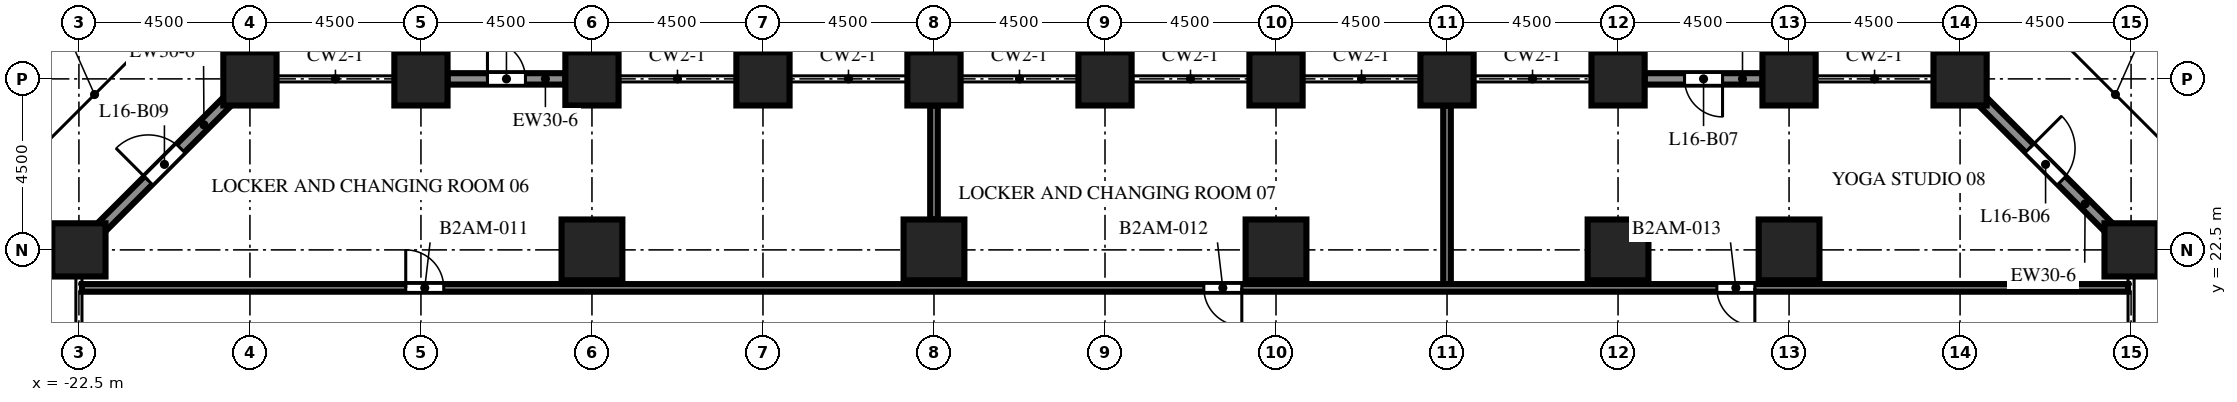
"""IFC4 building model, lengths in metres.
Left out: names, types, materials, properties, quantities, classifications, styles, units other than length and angle.
Written with IfcOpenShell. Run it as: python <this file> out.ifc"""

import sys

from ifc_helpers import new_model, si_unit, direction, frame, frame_2d, origin, origin_2d, place, context, subcontext, project, spatial, rectangle, extrude, element, fill, save


model = new_model("IFC4")
c1 = context("Model", 3, precision=1e-05, world=origin(), true_north=direction((0.0, 1.0)))
c2 = subcontext(c1, "Body", "Model", "MODEL_VIEW")
j1 = project(units=[si_unit("LENGTHUNIT", "METRE"), si_unit("PLANEANGLEUNIT", "RADIAN")], contexts=[c1])
p1 = place(None, origin())
s1 = spatial("IfcSite", under=j1, at=p1, CompositionType="ELEMENT")
p2 = place(p1, origin())
s2 = spatial("IfcBuilding", under=s1, at=p2, CompositionType="ELEMENT")
p3 = place(p2, frame((0.0, 0.0, 70.6)))
s3 = spatial("IfcBuildingStorey", under=s2, at=p3, CompositionType="ELEMENT", Elevation=70.6)
for number, where, z_axis, x_axis in (
    (1, (-22.5, 22.5, 0.0), (0.0, 0.0, 1.0), (1.0, 0.0, 0.0)),
    (2, (-18.0, 27.0, 0.0), (0.0, 0.0, 1.0), (1.0, 0.0, 0.0)),
    (3, (-13.5, 27.0, 0.0), (0.0, 0.0, 1.0), (1.0, 0.0, 0.0)),
    (4, (-9.0, 27.0, 0.0), (0.0, 0.0, 1.0), (1.0, 0.0, 0.0)),
    (5, (-4.5, 27.0, 0.0), (0.0, 0.0, 1.0), (1.0, 0.0, 0.0)),
    (6, (0.0, 27.0, 0.0), (0.0, 0.0, 1.0), (1.0, 0.0, 0.0)),
    (7, (4.5, 27.0, 0.0), (0.0, 0.0, 1.0), (1.0, 0.0, 0.0)),
    (8, (9.0, 27.0, 0.0), (0.0, 0.0, 1.0), (1.0, 0.0, 0.0)),
    (9, (13.5, 27.0, 0.0), (0.0, 0.0, 1.0), (1.0, 0.0, 0.0)),
    (10, (18.0, 27.0, 0.0), (0.0, 0.0, 1.0), (1.0, 0.0, 0.0)),
    (11, (22.5, 27.0, 0.0), (0.0, 0.0, 1.0), (1.0, 0.0, 0.0)),
    (12, (27.0, 27.0, 0.0), (0.0, 0.0, 1.0), (1.0, 0.0, 0.0)),
    (13, (31.5, 22.5, 0.0), (0.0, 0.0, 1.0), (1.0, 0.0, 0.0)),
):
    element("IfcColumn", number, at=place(p3, frame(where, z_axis=z_axis, x_axis=x_axis)), inside=s3, PredefinedType="COLUMN", context=c2, shape_type="SweptSolid", body=[
        extrude(rectangle(XDim=1.4, YDim=1.4, at=origin_2d()), origin(), (0.0, 0.0, 1.0), 6.0),
    ])
for number, where, z_axis, x_axis in (
    (14, (-9.0, 22.5, 0.0), (0.0, 0.0, 1.0), (1.0, 0.0, 0.0)),
    (15, (0.0, 22.5, 0.0), (0.0, 0.0, 1.0), (1.0, 0.0, 0.0)),
    (16, (9.0, 22.5, 0.0), (0.0, 0.0, 1.0), (1.0, 0.0, 0.0)),
    (17, (18.0, 22.5, 0.0), (0.0, 0.0, 1.0), (1.0, 0.0, 0.0)),
    (18, (22.5, 22.5, 0.0), (0.0, 0.0, 1.0), (1.0, 0.0, 0.0)),
):
    element("IfcColumn", number, at=place(p3, frame(where, z_axis=z_axis, x_axis=x_axis)), inside=s3, PredefinedType="COLUMN", context=c2, shape_type="SweptSolid", body=[
        extrude(rectangle(XDim=1.6, YDim=1.6, at=origin_2d()), origin(), (0.0, 0.0, 1.0), 6.0),
    ])
p4 = place(p3, frame((27.594, 26.406, 0.0), z_axis=(0.0, 0.0, 1.0), x_axis=(0.707106781187, -0.707106781187, 0.0)))
e19 = element("IfcWall", 19, at=p4, inside=s3, PredefinedType="SOLIDWALL", context=c2, shape_type="SweptSolid", body=[
    extrude(rectangle(XDim=4.684, YDim=0.3, at=frame_2d((2.342, 0.0))), origin(), (0.0, 0.0, 1.0), 4.5),
])
p5 = place(p4, frame((1.742, 0.0, 0.0)))
e20 = element("IfcOpeningElement", 20, at=p5, cuts=e19, PredefinedType="OPENING", context=c2, shape_type="SweptSolid", body=[
    extrude(rectangle(XDim=1.2, YDim=2.2, at=frame_2d((0.6, 1.1))), frame((0.0, 0.16, 0.0), z_axis=(0.0, -1.0, 0.0), x_axis=(1.0, 0.0, 0.0)), (0.0, 0.0, 1.0), 0.32),
])
p6 = place(p3, frame((18.7, 27.0, 0.0), z_axis=(0.0, 0.0, 1.0), x_axis=(1.0, 0.0, 0.0)))
e21 = element("IfcWall", 21, at=p6, inside=s3, PredefinedType="SOLIDWALL", context=c2, shape_type="SweptSolid", body=[
    extrude(rectangle(XDim=3.1, YDim=0.3, at=frame_2d((1.55, 0.0))), origin(), (0.0, 0.0, 1.0), 4.5),
])
p7 = place(p6, frame((1.05, 0.0, 0.0)))
e22 = element("IfcOpeningElement", 22, at=p7, cuts=e21, PredefinedType="OPENING", context=c2, shape_type="SweptSolid", body=[
    extrude(rectangle(XDim=1.0, YDim=2.2, at=frame_2d((0.5, 1.1))), frame((0.0, 0.16, 0.0), z_axis=(0.0, -1.0, 0.0), x_axis=(1.0, 0.0, 0.0)), (0.0, 0.0, 1.0), 0.32),
])
p8 = place(p3, frame((-12.8, 27.0, 0.0), z_axis=(0.0, 0.0, 1.0), x_axis=(1.0, 0.0, 0.0)))
e23 = element("IfcWall", 23, at=p8, inside=s3, PredefinedType="SOLIDWALL", context=c2, shape_type="SweptSolid", body=[
    extrude(rectangle(XDim=3.1, YDim=0.3, at=frame_2d((1.55, 0.0))), origin(), (0.0, 0.0, 1.0), 4.5),
])
p9 = place(p8, frame((1.05, 0.0, 0.0)))
e24 = element("IfcOpeningElement", 24, at=p9, cuts=e23, PredefinedType="OPENING", context=c2, shape_type="SweptSolid", body=[
    extrude(rectangle(XDim=1.0, YDim=2.2, at=frame_2d((0.5, 1.1))), frame((0.0, 0.16, 0.0), z_axis=(0.0, -1.0, 0.0), x_axis=(1.0, 0.0, 0.0)), (0.0, 0.0, 1.0), 0.32),
])
p10 = place(p3, frame((-21.906, 23.094, 0.0), z_axis=(0.0, 0.0, 1.0), x_axis=(0.707106781187, 0.707106781187, 0.0)))
e25 = element("IfcWall", 25, at=p10, inside=s3, PredefinedType="SOLIDWALL", context=c2, shape_type="SweptSolid", body=[
    extrude(rectangle(XDim=4.684, YDim=0.3, at=frame_2d((2.342, 0.0))), origin(), (0.0, 0.0, 1.0), 4.5),
])
p11 = place(p10, frame((1.742, 0.0, 0.0)))
e26 = element("IfcOpeningElement", 26, at=p11, cuts=e25, PredefinedType="OPENING", context=c2, shape_type="SweptSolid", body=[
    extrude(rectangle(XDim=1.2, YDim=2.2, at=frame_2d((0.6, 1.1))), frame((0.0, 0.16, 0.0), z_axis=(0.0, -1.0, 0.0), x_axis=(1.0, 0.0, 0.0)), (0.0, 0.0, 1.0), 0.32),
])
p12 = place(p3, frame((0.0, 23.3, 0.0), z_axis=(0.0, 0.0, 1.0), x_axis=(0.0, 1.0, 0.0)))
e27 = element("IfcWall", 27, at=p12, inside=s3, PredefinedType="PARTITIONING", context=c2, shape_type="SweptSolid", body=[
    extrude(rectangle(XDim=3.0, YDim=0.2, at=frame_2d((1.5, 0.0))), origin(), (0.0, 0.0, 1.0), 5.4),
])
p13 = place(p3, frame((13.5, 21.5, 0.0), z_axis=(0.0, 0.0, 1.0), x_axis=(0.0, 1.0, 0.0)))
e28 = element("IfcWall", 28, at=p13, inside=s3, PredefinedType="PARTITIONING", context=c2, shape_type="SweptSolid", body=[
    extrude(rectangle(XDim=4.8, YDim=0.2, at=frame_2d((2.4, 0.0))), origin(), (0.0, 0.0, 1.0), 5.4),
])
p14 = place(p3, frame((-22.42, 21.5, 0.0), z_axis=(0.0, 0.0, 1.0), x_axis=(1.0, 0.0, 0.0)))
e29 = element("IfcWall", 29, at=p14, inside=s3, PredefinedType="PARTITIONING", context=c2, shape_type="SweptSolid", body=[
    extrude(rectangle(XDim=53.84, YDim=0.2, at=frame_2d((26.92, 0.0))), origin(), (0.0, 0.0, 1.0), 5.4),
])
p15 = place(p14, frame((8.52, 0.0, 0.0)))
e30 = element("IfcOpeningElement", 30, at=p15, cuts=e29, PredefinedType="OPENING", context=c2, shape_type="SweptSolid", body=[
    extrude(rectangle(XDim=1.0, YDim=2.1, at=frame_2d((0.5, 1.05))), frame((0.0, 0.11, 0.0), z_axis=(0.0, -1.0, 0.0), x_axis=(1.0, 0.0, 0.0)), (0.0, 0.0, 1.0), 0.22),
])
p16 = place(p14, frame((29.52, 0.0, 0.0)))
e31 = element("IfcOpeningElement", 31, at=p16, cuts=e29, PredefinedType="OPENING", context=c2, shape_type="SweptSolid", body=[
    extrude(rectangle(XDim=1.0, YDim=2.1, at=frame_2d((0.5, 1.05))), frame((0.0, 0.11, 0.0), z_axis=(0.0, -1.0, 0.0), x_axis=(1.0, 0.0, 0.0)), (0.0, 0.0, 1.0), 0.22),
])
p17 = place(p14, frame((43.02, 0.0, 0.0)))
e32 = element("IfcOpeningElement", 32, at=p17, cuts=e29, PredefinedType="OPENING", context=c2, shape_type="SweptSolid", body=[
    extrude(rectangle(XDim=1.0, YDim=2.1, at=frame_2d((0.5, 1.05))), frame((0.0, 0.11, 0.0), z_axis=(0.0, -1.0, 0.0), x_axis=(1.0, 0.0, 0.0)), (0.0, 0.0, 1.0), 0.22),
])
p18 = place(p5, origin())
e33 = element("IfcDoor", 33, at=p18, inside=s3, OperationType="SINGLE_SWING_LEFT", PredefinedType="DOOR", context=c2, shape_type="SweptSolid", body=[
    extrude(rectangle(XDim=1.2, YDim=2.2, at=frame_2d((0.6, 1.1))), frame((0.0, 0.025, 0.0), z_axis=(0.0, -1.0, 0.0), x_axis=(1.0, 0.0, 0.0)), (0.0, 0.0, 1.0), 0.05),
])
fill(e20, e33)
p19 = place(p7, origin())
e34 = element("IfcDoor", 34, at=p19, inside=s3, OperationType="SINGLE_SWING_RIGHT", PredefinedType="DOOR", context=c2, shape_type="SweptSolid", body=[
    extrude(rectangle(XDim=1.0, YDim=2.2, at=frame_2d((0.5, 1.1))), frame((0.0, 0.025, 0.0), z_axis=(0.0, -1.0, 0.0), x_axis=(1.0, 0.0, 0.0)), (0.0, 0.0, 1.0), 0.05),
])
fill(e22, e34)
p20 = place(p9, origin())
e35 = element("IfcDoor", 35, at=p20, inside=s3, OperationType="SINGLE_SWING_LEFT", PredefinedType="DOOR", context=c2, shape_type="SweptSolid", body=[
    extrude(rectangle(XDim=1.0, YDim=2.2, at=frame_2d((0.5, 1.1))), frame((0.0, 0.025, 0.0), z_axis=(0.0, -1.0, 0.0), x_axis=(1.0, 0.0, 0.0)), (0.0, 0.0, 1.0), 0.05),
])
fill(e24, e35)
p21 = place(p11, origin())
e36 = element("IfcDoor", 36, at=p21, inside=s3, OperationType="SINGLE_SWING_LEFT", PredefinedType="DOOR", context=c2, shape_type="SweptSolid", body=[
    extrude(rectangle(XDim=1.2, YDim=2.2, at=frame_2d((0.6, 1.1))), frame((0.0, 0.025, 0.0), z_axis=(0.0, -1.0, 0.0), x_axis=(1.0, 0.0, 0.0)), (0.0, 0.0, 1.0), 0.05),
])
fill(e26, e36)
p22 = place(p15, origin())
e37 = element("IfcDoor", 37, at=p22, inside=s3, OperationType="SINGLE_SWING_LEFT", PredefinedType="DOOR", context=c2, shape_type="SweptSolid", body=[
    extrude(rectangle(XDim=1.0, YDim=2.1, at=frame_2d((0.5, 1.05))), frame((0.0, 0.025, 0.0), z_axis=(0.0, -1.0, 0.0), x_axis=(1.0, 0.0, 0.0)), (0.0, 0.0, 1.0), 0.05),
])
fill(e30, e37)
p23 = place(p16, origin())
e38 = element("IfcDoor", 38, at=p23, inside=s3, OperationType="SINGLE_SWING_RIGHT", PredefinedType="DOOR", context=c2, shape_type="SweptSolid", body=[
    extrude(rectangle(XDim=1.0, YDim=2.1, at=frame_2d((0.5, 1.05))), frame((0.0, 0.025, 0.0), z_axis=(0.0, -1.0, 0.0), x_axis=(1.0, 0.0, 0.0)), (0.0, 0.0, 1.0), 0.05),
])
fill(e31, e38)
p24 = place(p17, origin())
e39 = element("IfcDoor", 39, at=p24, inside=s3, OperationType="SINGLE_SWING_RIGHT", PredefinedType="DOOR", context=c2, shape_type="SweptSolid", body=[
    extrude(rectangle(XDim=1.0, YDim=2.1, at=frame_2d((0.5, 1.05))), frame((0.0, 0.025, 0.0), z_axis=(0.0, -1.0, 0.0), x_axis=(1.0, 0.0, 0.0)), (0.0, 0.0, 1.0), 0.05),
])
fill(e32, e39)
save(model, sys.argv[1])
